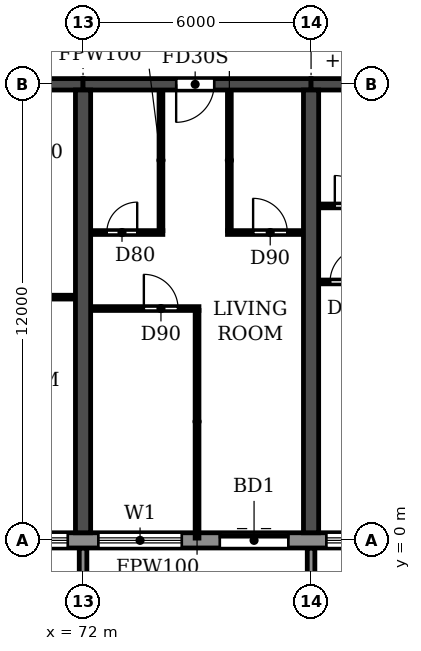
"""IFC4 building model, lengths in metres.
Left out: names, types, materials, properties, quantities, classifications, styles, units other than length and angle.
Written with IfcOpenShell. Run it as: python <this file> out.ifc"""

import sys

from ifc_helpers import new_model, si_unit, direction, frame, frame_2d, origin, place, context, subcontext, project, spatial, polyline, rectangle, outline, extrude, source, transform, mapped, element, fill, save


model = new_model("IFC4")
c1 = context("Model", 3, precision=1e-05, world=origin(), true_north=direction((0.0, 1.0)))
c2 = subcontext(c1, "Body", "Model", "MODEL_VIEW")
j1 = project(units=[si_unit("LENGTHUNIT", "METRE"), si_unit("PLANEANGLEUNIT", "RADIAN")], contexts=[c1])
p1 = place(None, origin())
s1 = spatial("IfcSite", under=j1, at=p1, CompositionType="ELEMENT")
p2 = place(p1, origin())
s2 = spatial("IfcBuilding", under=s1, at=p2, CompositionType="ELEMENT")
p3 = place(p2, frame((0.0, 0.0, 49.8)))
s3 = spatial("IfcBuildingStorey", under=s2, at=p3, CompositionType="ELEMENT", Elevation=49.8)
for number, where, z_axis, x_axis in (
    (1, (72.0, 0.2, 0.0), (0.0, 0.0, 1.0), (0.0, 1.0, 0.0)),
    (2, (78.0, 0.2, 0.0), (0.0, 0.0, 1.0), (0.0, 1.0, 0.0)),
):
    element("IfcWall", number, at=place(p3, frame(where, z_axis=z_axis, x_axis=x_axis)), inside=s3, PredefinedType="SHEAR", context=c2, shape_type="SweptSolid", body=[
        extrude(rectangle(XDim=11.65, YDim=0.4, at=frame_2d((5.825, 0.0))), origin(), (0.0, 0.0, 1.0), 3.0),
    ])
p4 = place(p3, frame((66.0, 12.0, 0.0), z_axis=(0.0, 0.0, 1.0), x_axis=(1.0, 0.0, 0.0)))
e3 = element("IfcWall", 3, at=p4, inside=s3, PredefinedType="SHEAR", context=c2, shape_type="SweptSolid", body=[
    extrude(rectangle(XDim=6.0, YDim=0.3, at=frame_2d((3.0, 0.0))), origin(), (0.0, 0.0, 1.0), 2.4),
])
p5 = place(p4, frame((2.55, 0.0, 0.0)))
e4 = element("IfcOpeningElement", 4, at=p5, cuts=e3, PredefinedType="OPENING", context=c2, shape_type="SweptSolid", body=[
    extrude(rectangle(XDim=1.0, YDim=2.1, at=frame_2d((0.5, 1.05))), frame((0.0, 0.16, 0.0), z_axis=(0.0, -1.0, 0.0), x_axis=(1.0, 0.0, 0.0)), (0.0, 0.0, 1.0), 0.32),
])
p6 = place(p3, frame((72.0, 12.0, 0.0), z_axis=(0.0, 0.0, 1.0), x_axis=(1.0, 0.0, 0.0)))
e5 = element("IfcWall", 5, at=p6, inside=s3, PredefinedType="SHEAR", context=c2, shape_type="SweptSolid", body=[
    extrude(rectangle(XDim=6.0, YDim=0.3, at=frame_2d((3.0, 0.0))), origin(), (0.0, 0.0, 1.0), 2.4),
])
p7 = place(p6, frame((2.45, 0.0, 0.0)))
e6 = element("IfcOpeningElement", 6, at=p7, cuts=e5, PredefinedType="OPENING", context=c2, shape_type="SweptSolid", body=[
    extrude(rectangle(XDim=1.0, YDim=2.1, at=frame_2d((0.5, 1.05))), frame((0.0, 0.16, 0.0), z_axis=(0.0, -1.0, 0.0), x_axis=(1.0, 0.0, 0.0)), (0.0, 0.0, 1.0), 0.32),
])
p8 = place(p3, frame((78.0, 12.0, 0.0), z_axis=(0.0, 0.0, 1.0), x_axis=(1.0, 0.0, 0.0)))
e7 = element("IfcWall", 7, at=p8, inside=s3, PredefinedType="SHEAR", context=c2, shape_type="SweptSolid", body=[
    extrude(rectangle(XDim=6.0, YDim=0.3, at=frame_2d((3.0, 0.0))), origin(), (0.0, 0.0, 1.0), 2.4),
])
p9 = place(p8, frame((2.45, 0.0, 0.0)))
e8 = element("IfcOpeningElement", 8, at=p9, cuts=e7, PredefinedType="OPENING", context=c2, shape_type="SweptSolid", body=[
    extrude(rectangle(XDim=1.0, YDim=2.1, at=frame_2d((0.5, 1.05))), frame((0.0, 0.16, 0.0), z_axis=(0.0, -1.0, 0.0), x_axis=(1.0, 0.0, 0.0)), (0.0, 0.0, 1.0), 0.32),
])
p10 = place(p3, frame((4.683, 0.0, 0.0), z_axis=(0.0, 0.0, 1.0), x_axis=(1.0, 0.0, 0.0)))
e9 = element("IfcWall", 9, at=p10, inside=s3, PredefinedType="STANDARD", context=c2, shape_type="SweptSolid", body=[
    extrude(rectangle(XDim=92.634, YDim=0.4, at=frame_2d((46.317, 0.0))), origin(), (0.0, 0.0, 1.0), 3.0),
])
p11 = place(p10, frame((1.717, 0.0, 0.9)))
e10 = element("IfcOpeningElement", 10, at=p11, cuts=e9, PredefinedType="OPENING", context=c2, shape_type="SweptSolid", body=[
    extrude(rectangle(XDim=2.2, YDim=1.5, at=frame_2d((1.1, 0.75))), frame((0.0, 0.21, 0.0), z_axis=(0.0, -1.0, 0.0), x_axis=(1.0, 0.0, 0.0)), (0.0, 0.0, 1.0), 0.42),
])
p12 = place(p10, frame((4.717, 0.0, 0.9)))
e11 = element("IfcOpeningElement", 11, at=p12, cuts=e9, PredefinedType="OPENING", context=c2, shape_type="SweptSolid", body=[
    extrude(rectangle(XDim=2.2, YDim=1.5, at=frame_2d((1.1, 0.75))), frame((0.0, 0.21, 0.0), z_axis=(0.0, -1.0, 0.0), x_axis=(1.0, 0.0, 0.0)), (0.0, 0.0, 1.0), 0.42),
])
p13 = place(p10, frame((7.717, 0.0, 0.9)))
e12 = element("IfcOpeningElement", 12, at=p13, cuts=e9, PredefinedType="OPENING", context=c2, shape_type="SweptSolid", body=[
    extrude(rectangle(XDim=2.2, YDim=1.5, at=frame_2d((1.1, 0.75))), frame((0.0, 0.21, 0.0), z_axis=(0.0, -1.0, 0.0), x_axis=(1.0, 0.0, 0.0)), (0.0, 0.0, 1.0), 0.42),
])
p14 = place(p10, frame((10.917, 0.0, 0.0)))
e13 = element("IfcOpeningElement", 13, at=p14, cuts=e9, PredefinedType="OPENING", context=c2, shape_type="SweptSolid", body=[
    extrude(rectangle(XDim=1.8, YDim=2.4, at=frame_2d((0.9, 1.2))), frame((0.0, 0.21, 0.0), z_axis=(0.0, -1.0, 0.0), x_axis=(1.0, 0.0, 0.0)), (0.0, 0.0, 1.0), 0.42),
])
p15 = place(p10, frame((13.717, 0.0, 0.9)))
e14 = element("IfcOpeningElement", 14, at=p15, cuts=e9, PredefinedType="OPENING", context=c2, shape_type="SweptSolid", body=[
    extrude(rectangle(XDim=2.2, YDim=1.5, at=frame_2d((1.1, 0.75))), frame((0.0, 0.21, 0.0), z_axis=(0.0, -1.0, 0.0), x_axis=(1.0, 0.0, 0.0)), (0.0, 0.0, 1.0), 0.42),
])
p16 = place(p10, frame((16.717, 0.0, 0.9)))
e15 = element("IfcOpeningElement", 15, at=p16, cuts=e9, PredefinedType="OPENING", context=c2, shape_type="SweptSolid", body=[
    extrude(rectangle(XDim=2.2, YDim=1.5, at=frame_2d((1.1, 0.75))), frame((0.0, 0.21, 0.0), z_axis=(0.0, -1.0, 0.0), x_axis=(1.0, 0.0, 0.0)), (0.0, 0.0, 1.0), 0.42),
])
p17 = place(p10, frame((19.917, 0.0, 0.0)))
e16 = element("IfcOpeningElement", 16, at=p17, cuts=e9, PredefinedType="OPENING", context=c2, shape_type="SweptSolid", body=[
    extrude(rectangle(XDim=1.8, YDim=2.4, at=frame_2d((0.9, 1.2))), frame((0.0, 0.21, 0.0), z_axis=(0.0, -1.0, 0.0), x_axis=(1.0, 0.0, 0.0)), (0.0, 0.0, 1.0), 0.42),
])
p18 = place(p10, frame((22.717, 0.0, 0.9)))
e17 = element("IfcOpeningElement", 17, at=p18, cuts=e9, PredefinedType="OPENING", context=c2, shape_type="SweptSolid", body=[
    extrude(rectangle(XDim=2.2, YDim=1.5, at=frame_2d((1.1, 0.75))), frame((0.0, 0.21, 0.0), z_axis=(0.0, -1.0, 0.0), x_axis=(1.0, 0.0, 0.0)), (0.0, 0.0, 1.0), 0.42),
])
p19 = place(p10, frame((25.717, 0.0, 0.9)))
e18 = element("IfcOpeningElement", 18, at=p19, cuts=e9, PredefinedType="OPENING", context=c2, shape_type="SweptSolid", body=[
    extrude(rectangle(XDim=2.2, YDim=1.5, at=frame_2d((1.1, 0.75))), frame((0.0, 0.21, 0.0), z_axis=(0.0, -1.0, 0.0), x_axis=(1.0, 0.0, 0.0)), (0.0, 0.0, 1.0), 0.42),
])
p20 = place(p10, frame((28.717, 0.0, 0.9)))
e19 = element("IfcOpeningElement", 19, at=p20, cuts=e9, PredefinedType="OPENING", context=c2, shape_type="SweptSolid", body=[
    extrude(rectangle(XDim=2.2, YDim=1.5, at=frame_2d((1.1, 0.75))), frame((0.0, 0.21, 0.0), z_axis=(0.0, -1.0, 0.0), x_axis=(1.0, 0.0, 0.0)), (0.0, 0.0, 1.0), 0.42),
])
p21 = place(p10, frame((31.717, 0.0, 0.9)))
e20 = element("IfcOpeningElement", 20, at=p21, cuts=e9, PredefinedType="OPENING", context=c2, shape_type="SweptSolid", body=[
    extrude(rectangle(XDim=2.2, YDim=1.5, at=frame_2d((1.1, 0.75))), frame((0.0, 0.21, 0.0), z_axis=(0.0, -1.0, 0.0), x_axis=(1.0, 0.0, 0.0)), (0.0, 0.0, 1.0), 0.42),
])
p22 = place(p10, frame((34.917, 0.0, 0.0)))
e21 = element("IfcOpeningElement", 21, at=p22, cuts=e9, PredefinedType="OPENING", context=c2, shape_type="SweptSolid", body=[
    extrude(rectangle(XDim=1.8, YDim=2.4, at=frame_2d((0.9, 1.2))), frame((0.0, 0.21, 0.0), z_axis=(0.0, -1.0, 0.0), x_axis=(1.0, 0.0, 0.0)), (0.0, 0.0, 1.0), 0.42),
])
p23 = place(p10, frame((37.717, 0.0, 0.9)))
e22 = element("IfcOpeningElement", 22, at=p23, cuts=e9, PredefinedType="OPENING", context=c2, shape_type="SweptSolid", body=[
    extrude(rectangle(XDim=2.2, YDim=1.5, at=frame_2d((1.1, 0.75))), frame((0.0, 0.21, 0.0), z_axis=(0.0, -1.0, 0.0), x_axis=(1.0, 0.0, 0.0)), (0.0, 0.0, 1.0), 0.42),
])
p24 = place(p10, frame((40.717, 0.0, 0.9)))
e23 = element("IfcOpeningElement", 23, at=p24, cuts=e9, PredefinedType="OPENING", context=c2, shape_type="SweptSolid", body=[
    extrude(rectangle(XDim=2.2, YDim=1.5, at=frame_2d((1.1, 0.75))), frame((0.0, 0.21, 0.0), z_axis=(0.0, -1.0, 0.0), x_axis=(1.0, 0.0, 0.0)), (0.0, 0.0, 1.0), 0.42),
])
p25 = place(p10, frame((43.717, 0.0, 0.9)))
e24 = element("IfcOpeningElement", 24, at=p25, cuts=e9, PredefinedType="OPENING", context=c2, shape_type="SweptSolid", body=[
    extrude(rectangle(XDim=2.2, YDim=1.5, at=frame_2d((1.1, 0.75))), frame((0.0, 0.21, 0.0), z_axis=(0.0, -1.0, 0.0), x_axis=(1.0, 0.0, 0.0)), (0.0, 0.0, 1.0), 0.42),
])
p26 = place(p10, frame((46.917, 0.0, 0.0)))
e25 = element("IfcOpeningElement", 25, at=p26, cuts=e9, PredefinedType="OPENING", context=c2, shape_type="SweptSolid", body=[
    extrude(rectangle(XDim=1.8, YDim=2.4, at=frame_2d((0.9, 1.2))), frame((0.0, 0.21, 0.0), z_axis=(0.0, -1.0, 0.0), x_axis=(1.0, 0.0, 0.0)), (0.0, 0.0, 1.0), 0.42),
])
p27 = place(p10, frame((49.717, 0.0, 0.9)))
e26 = element("IfcOpeningElement", 26, at=p27, cuts=e9, PredefinedType="OPENING", context=c2, shape_type="SweptSolid", body=[
    extrude(rectangle(XDim=2.2, YDim=1.5, at=frame_2d((1.1, 0.75))), frame((0.0, 0.21, 0.0), z_axis=(0.0, -1.0, 0.0), x_axis=(1.0, 0.0, 0.0)), (0.0, 0.0, 1.0), 0.42),
])
p28 = place(p10, frame((52.717, 0.0, 0.9)))
e27 = element("IfcOpeningElement", 27, at=p28, cuts=e9, PredefinedType="OPENING", context=c2, shape_type="SweptSolid", body=[
    extrude(rectangle(XDim=2.2, YDim=1.5, at=frame_2d((1.1, 0.75))), frame((0.0, 0.21, 0.0), z_axis=(0.0, -1.0, 0.0), x_axis=(1.0, 0.0, 0.0)), (0.0, 0.0, 1.0), 0.42),
])
p29 = place(p10, frame((55.717, 0.0, 0.9)))
e28 = element("IfcOpeningElement", 28, at=p29, cuts=e9, PredefinedType="OPENING", context=c2, shape_type="SweptSolid", body=[
    extrude(rectangle(XDim=2.2, YDim=1.5, at=frame_2d((1.1, 0.75))), frame((0.0, 0.21, 0.0), z_axis=(0.0, -1.0, 0.0), x_axis=(1.0, 0.0, 0.0)), (0.0, 0.0, 1.0), 0.42),
])
p30 = place(p10, frame((58.917, 0.0, 0.0)))
e29 = element("IfcOpeningElement", 29, at=p30, cuts=e9, PredefinedType="OPENING", context=c2, shape_type="SweptSolid", body=[
    extrude(rectangle(XDim=1.8, YDim=2.4, at=frame_2d((0.9, 1.2))), frame((0.0, 0.21, 0.0), z_axis=(0.0, -1.0, 0.0), x_axis=(1.0, 0.0, 0.0)), (0.0, 0.0, 1.0), 0.42),
])
p31 = place(p10, frame((61.717, 0.0, 0.9)))
e30 = element("IfcOpeningElement", 30, at=p31, cuts=e9, PredefinedType="OPENING", context=c2, shape_type="SweptSolid", body=[
    extrude(rectangle(XDim=2.2, YDim=1.5, at=frame_2d((1.1, 0.75))), frame((0.0, 0.21, 0.0), z_axis=(0.0, -1.0, 0.0), x_axis=(1.0, 0.0, 0.0)), (0.0, 0.0, 1.0), 0.42),
])
p32 = place(p10, frame((64.717, 0.0, 0.9)))
e31 = element("IfcOpeningElement", 31, at=p32, cuts=e9, PredefinedType="OPENING", context=c2, shape_type="SweptSolid", body=[
    extrude(rectangle(XDim=2.2, YDim=1.5, at=frame_2d((1.1, 0.75))), frame((0.0, 0.21, 0.0), z_axis=(0.0, -1.0, 0.0), x_axis=(1.0, 0.0, 0.0)), (0.0, 0.0, 1.0), 0.42),
])
p33 = place(p10, frame((67.717, 0.0, 0.9)))
e32 = element("IfcOpeningElement", 32, at=p33, cuts=e9, PredefinedType="OPENING", context=c2, shape_type="SweptSolid", body=[
    extrude(rectangle(XDim=2.2, YDim=1.5, at=frame_2d((1.1, 0.75))), frame((0.0, 0.21, 0.0), z_axis=(0.0, -1.0, 0.0), x_axis=(1.0, 0.0, 0.0)), (0.0, 0.0, 1.0), 0.42),
])
p34 = place(p10, frame((70.917, 0.0, 0.0)))
e33 = element("IfcOpeningElement", 33, at=p34, cuts=e9, PredefinedType="OPENING", context=c2, shape_type="SweptSolid", body=[
    extrude(rectangle(XDim=1.8, YDim=2.4, at=frame_2d((0.9, 1.2))), frame((0.0, 0.21, 0.0), z_axis=(0.0, -1.0, 0.0), x_axis=(1.0, 0.0, 0.0)), (0.0, 0.0, 1.0), 0.42),
])
p35 = place(p10, frame((73.717, 0.0, 0.9)))
e34 = element("IfcOpeningElement", 34, at=p35, cuts=e9, PredefinedType="OPENING", context=c2, shape_type="SweptSolid", body=[
    extrude(rectangle(XDim=2.2, YDim=1.5, at=frame_2d((1.1, 0.75))), frame((0.0, 0.21, 0.0), z_axis=(0.0, -1.0, 0.0), x_axis=(1.0, 0.0, 0.0)), (0.0, 0.0, 1.0), 0.42),
])
p36 = place(p10, frame((76.717, 0.0, 0.9)))
e35 = element("IfcOpeningElement", 35, at=p36, cuts=e9, PredefinedType="OPENING", context=c2, shape_type="SweptSolid", body=[
    extrude(rectangle(XDim=2.2, YDim=1.5, at=frame_2d((1.1, 0.75))), frame((0.0, 0.21, 0.0), z_axis=(0.0, -1.0, 0.0), x_axis=(1.0, 0.0, 0.0)), (0.0, 0.0, 1.0), 0.42),
])
p37 = place(p10, frame((79.717, 0.0, 0.9)))
e36 = element("IfcOpeningElement", 36, at=p37, cuts=e9, PredefinedType="OPENING", context=c2, shape_type="SweptSolid", body=[
    extrude(rectangle(XDim=2.2, YDim=1.5, at=frame_2d((1.1, 0.75))), frame((0.0, 0.21, 0.0), z_axis=(0.0, -1.0, 0.0), x_axis=(1.0, 0.0, 0.0)), (0.0, 0.0, 1.0), 0.42),
])
p38 = place(p10, frame((82.917, 0.0, 0.0)))
e37 = element("IfcOpeningElement", 37, at=p38, cuts=e9, PredefinedType="OPENING", context=c2, shape_type="SweptSolid", body=[
    extrude(rectangle(XDim=1.8, YDim=2.4, at=frame_2d((0.9, 1.2))), frame((0.0, 0.21, 0.0), z_axis=(0.0, -1.0, 0.0), x_axis=(1.0, 0.0, 0.0)), (0.0, 0.0, 1.0), 0.42),
])
p39 = place(p10, frame((85.717, 0.0, 0.9)))
e38 = element("IfcOpeningElement", 38, at=p39, cuts=e9, PredefinedType="OPENING", context=c2, shape_type="SweptSolid", body=[
    extrude(rectangle(XDim=2.2, YDim=1.5, at=frame_2d((1.1, 0.75))), frame((0.0, 0.21, 0.0), z_axis=(0.0, -1.0, 0.0), x_axis=(1.0, 0.0, 0.0)), (0.0, 0.0, 1.0), 0.42),
])
p40 = place(p10, frame((88.717, 0.0, 0.9)))
e39 = element("IfcOpeningElement", 39, at=p40, cuts=e9, PredefinedType="OPENING", context=c2, shape_type="SweptSolid", body=[
    extrude(rectangle(XDim=2.2, YDim=1.5, at=frame_2d((1.1, 0.75))), frame((0.0, 0.21, 0.0), z_axis=(0.0, -1.0, 0.0), x_axis=(1.0, 0.0, 0.0)), (0.0, 0.0, 1.0), 0.42),
])
m1 = source(origin(), c2, "Body", "SweptSolid", [
    extrude(outline(polyline([(0.0, 0.0), (0.2, 0.0), (0.2, 1.65), (0.0, 1.65), (0.0, 0.0)])), origin(), (0.0, 0.0, 1.0), 3.1),
])
for number, where in (
    (40, (71.9, -1.85, 0.0)),
    (41, (77.9, -1.85, 0.0)),
):
    element("IfcWall", number, at=place(p3, frame(where)), inside=s3, PredefinedType="STANDARD", context=c2, shape_type="MappedRepresentation", body=[
        mapped(m1, transform((0.0, 0.0, 0.0))),
    ])
p41 = place(p3, frame((72.21, 6.1, 0.0), z_axis=(0.0, 0.0, 1.0), x_axis=(1.0, 0.0, 0.0)))
e42 = element("IfcWall", 42, at=p41, inside=s3, PredefinedType="PARTITIONING", context=c2, shape_type="SweptSolid", body=[
    extrude(rectangle(XDim=2.84, YDim=0.1, at=frame_2d((1.42, 0.0))), origin(), (0.0, 0.0, 1.0), 3.0),
])
p42 = place(p41, frame((1.39, 0.0, 0.0)))
e43 = element("IfcOpeningElement", 43, at=p42, cuts=e42, PredefinedType="OPENING", context=c2, shape_type="SweptSolid", body=[
    extrude(rectangle(XDim=0.9, YDim=2.1, at=frame_2d((0.45, 1.05))), frame((0.0, 0.06, 0.0), z_axis=(0.0, -1.0, 0.0), x_axis=(1.0, 0.0, 0.0)), (0.0, 0.0, 1.0), 0.12),
])
p43 = place(p3, frame((69.9, 6.4, 0.0), z_axis=(0.0, 0.0, 1.0), x_axis=(1.0, 0.0, 0.0)))
e44 = element("IfcWall", 44, at=p43, inside=s3, PredefinedType="PARTITIONING", context=c2, shape_type="SweptSolid", body=[
    extrude(rectangle(XDim=1.89, YDim=0.1, at=frame_2d((0.945, 0.0))), origin(), (0.0, 0.0, 1.0), 3.0),
])
p44 = place(p3, frame((78.21, 6.8, 0.0), z_axis=(0.0, 0.0, 1.0), x_axis=(1.0, 0.0, 0.0)))
e45 = element("IfcWall", 45, at=p44, inside=s3, PredefinedType="PARTITIONING", context=c2, shape_type="SweptSolid", body=[
    extrude(rectangle(XDim=2.84, YDim=0.1, at=frame_2d((1.42, 0.0))), origin(), (0.0, 0.0, 1.0), 3.0),
])
p45 = place(p44, frame((0.29, 0.0, 0.0)))
e46 = element("IfcOpeningElement", 46, at=p45, cuts=e45, PredefinedType="OPENING", context=c2, shape_type="SweptSolid", body=[
    extrude(rectangle(XDim=0.9, YDim=2.1, at=frame_2d((0.45, 1.05))), frame((0.0, 0.06, 0.0), z_axis=(0.0, -1.0, 0.0), x_axis=(1.0, 0.0, 0.0)), (0.0, 0.0, 1.0), 0.12),
])
p46 = place(p3, frame((72.21, 8.1, 0.0), z_axis=(0.0, 0.0, 1.0), x_axis=(1.0, 0.0, 0.0)))
e47 = element("IfcWall", 47, at=p46, inside=s3, PredefinedType="PARTITIONING", context=c2, shape_type="SweptSolid", body=[
    extrude(rectangle(XDim=1.89, YDim=0.1, at=frame_2d((0.945, 0.0))), origin(), (0.0, 0.0, 1.0), 3.0),
])
p47 = place(p46, frame((0.415, 0.0, 0.0)))
e48 = element("IfcOpeningElement", 48, at=p47, cuts=e47, PredefinedType="OPENING", context=c2, shape_type="SweptSolid", body=[
    extrude(rectangle(XDim=0.8, YDim=2.1, at=frame_2d((0.4, 1.05))), frame((0.0, 0.06, 0.0), z_axis=(0.0, -1.0, 0.0), x_axis=(1.0, 0.0, 0.0)), (0.0, 0.0, 1.0), 0.12),
])
p48 = place(p3, frame((75.8, 8.1, 0.0), z_axis=(0.0, 0.0, 1.0), x_axis=(1.0, 0.0, 0.0)))
e49 = element("IfcWall", 49, at=p48, inside=s3, PredefinedType="PARTITIONING", context=c2, shape_type="SweptSolid", body=[
    extrude(rectangle(XDim=1.99, YDim=0.1, at=frame_2d((0.995, 0.0))), origin(), (0.0, 0.0, 1.0), 3.0),
])
p49 = place(p48, frame((0.675, 0.0, 0.0)))
e50 = element("IfcOpeningElement", 50, at=p49, cuts=e49, PredefinedType="OPENING", context=c2, shape_type="SweptSolid", body=[
    extrude(rectangle(XDim=0.9, YDim=2.1, at=frame_2d((0.45, 1.05))), frame((0.0, 0.06, 0.0), z_axis=(0.0, -1.0, 0.0), x_axis=(1.0, 0.0, 0.0)), (0.0, 0.0, 1.0), 0.12),
])
p50 = place(p3, frame((78.21, 8.8, 0.0), z_axis=(0.0, 0.0, 1.0), x_axis=(1.0, 0.0, 0.0)))
e51 = element("IfcWall", 51, at=p50, inside=s3, PredefinedType="PARTITIONING", context=c2, shape_type="SweptSolid", body=[
    extrude(rectangle(XDim=1.89, YDim=0.1, at=frame_2d((0.945, 0.0))), origin(), (0.0, 0.0, 1.0), 3.0),
])
p51 = place(p50, frame((0.415, 0.0, 0.0)))
e52 = element("IfcOpeningElement", 52, at=p51, cuts=e51, PredefinedType="OPENING", context=c2, shape_type="SweptSolid", body=[
    extrude(rectangle(XDim=0.8, YDim=2.1, at=frame_2d((0.4, 1.05))), frame((0.0, 0.06, 0.0), z_axis=(0.0, -1.0, 0.0), x_axis=(1.0, 0.0, 0.0)), (0.0, 0.0, 1.0), 0.12),
])
p52 = place(p3, frame((74.05, 8.15, 0.0), z_axis=(0.0, 0.0, 1.0), x_axis=(0.0, 1.0, 0.0)))
e53 = element("IfcWall", 53, at=p52, inside=s3, PredefinedType="PARTITIONING", context=c2, shape_type="SweptSolid", body=[
    extrude(rectangle(XDim=3.69, YDim=0.1, at=frame_2d((1.845, 0.0))), origin(), (0.0, 0.0, 1.0), 3.0),
])
p53 = place(p3, frame((75.0, 0.06, 0.0), z_axis=(0.0, 0.0, 1.0), x_axis=(0.0, 1.0, 0.0)))
e54 = element("IfcWall", 54, at=p53, inside=s3, PredefinedType="PARTITIONING", context=c2, shape_type="SweptSolid", body=[
    extrude(rectangle(XDim=5.99, YDim=0.1, at=frame_2d((2.995, 0.0))), origin(), (0.0, 0.0, 1.0), 3.0),
])
p54 = place(p3, frame((75.85, 8.15, 0.0), z_axis=(0.0, 0.0, 1.0), x_axis=(0.0, 1.0, 0.0)))
e55 = element("IfcWall", 55, at=p54, inside=s3, PredefinedType="PARTITIONING", context=c2, shape_type="SweptSolid", body=[
    extrude(rectangle(XDim=3.69, YDim=0.1, at=frame_2d((1.845, 0.0))), origin(), (0.0, 0.0, 1.0), 3.0),
])
p55 = place(p32, origin())
e56 = element("IfcWindow", 56, at=p55, inside=s3, PartitioningType="DOUBLE_PANEL_HORIZONTAL", PredefinedType="WINDOW", context=c2, shape_type="SweptSolid", body=[
    extrude(rectangle(XDim=2.2, YDim=1.5, at=frame_2d((1.1, 0.75))), frame((0.0, 0.03, 0.0), z_axis=(0.0, -1.0, 0.0), x_axis=(1.0, 0.0, 0.0)), (0.0, 0.0, 1.0), 0.06),
])
fill(e31, e56)
p56 = place(p33, origin())
e57 = element("IfcWindow", 57, at=p56, inside=s3, PartitioningType="DOUBLE_PANEL_HORIZONTAL", PredefinedType="WINDOW", context=c2, shape_type="SweptSolid", body=[
    extrude(rectangle(XDim=2.2, YDim=1.5, at=frame_2d((1.1, 0.75))), frame((0.0, 0.03, 0.0), z_axis=(0.0, -1.0, 0.0), x_axis=(1.0, 0.0, 0.0)), (0.0, 0.0, 1.0), 0.06),
])
fill(e32, e57)
p57 = place(p34, origin())
e58 = element("IfcDoor", 58, at=p57, inside=s3, OperationType="DOUBLE_DOOR_SLIDING", PredefinedType="DOOR", context=c2, shape_type="SweptSolid", body=[
    extrude(rectangle(XDim=1.8, YDim=2.4, at=frame_2d((0.9, 1.2))), frame((0.0, 0.025, 0.0), z_axis=(0.0, -1.0, 0.0), x_axis=(1.0, 0.0, 0.0)), (0.0, 0.0, 1.0), 0.05),
])
fill(e33, e58)
p58 = place(p35, origin())
e59 = element("IfcWindow", 59, at=p58, inside=s3, PartitioningType="DOUBLE_PANEL_HORIZONTAL", PredefinedType="WINDOW", context=c2, shape_type="SweptSolid", body=[
    extrude(rectangle(XDim=2.2, YDim=1.5, at=frame_2d((1.1, 0.75))), frame((0.0, 0.03, 0.0), z_axis=(0.0, -1.0, 0.0), x_axis=(1.0, 0.0, 0.0)), (0.0, 0.0, 1.0), 0.06),
])
fill(e34, e59)
p59 = place(p47, origin())
e60 = element("IfcDoor", 60, at=p59, inside=s3, OperationType="SINGLE_SWING_RIGHT", PredefinedType="DOOR", context=c2, shape_type="SweptSolid", body=[
    extrude(rectangle(XDim=0.8, YDim=2.1, at=frame_2d((0.4, 1.05))), frame((0.0, 0.025, 0.0), z_axis=(0.0, -1.0, 0.0), x_axis=(1.0, 0.0, 0.0)), (0.0, 0.0, 1.0), 0.05),
])
fill(e48, e60)
p60 = place(p42, origin())
e61 = element("IfcDoor", 61, at=p60, inside=s3, OperationType="SINGLE_SWING_LEFT", PredefinedType="DOOR", context=c2, shape_type="SweptSolid", body=[
    extrude(rectangle(XDim=0.9, YDim=2.1, at=frame_2d((0.45, 1.05))), frame((0.0, 0.025, 0.0), z_axis=(0.0, -1.0, 0.0), x_axis=(1.0, 0.0, 0.0)), (0.0, 0.0, 1.0), 0.05),
])
fill(e43, e61)
p61 = place(p7, frame((1.0, 0.0, 0.0), z_axis=(0.0, 0.0, 1.0), x_axis=(-1.0, 0.0, 0.0)))
e62 = element("IfcDoor", 62, at=p61, inside=s3, OperationType="SINGLE_SWING_RIGHT", PredefinedType="DOOR", context=c2, shape_type="SweptSolid", body=[
    extrude(rectangle(XDim=1.0, YDim=2.1, at=frame_2d((0.5, 1.05))), frame((0.0, 0.025, 0.0), z_axis=(0.0, -1.0, 0.0), x_axis=(1.0, 0.0, 0.0)), (0.0, 0.0, 1.0), 0.05),
])
fill(e6, e62)
p62 = place(p49, origin())
e63 = element("IfcDoor", 63, at=p62, inside=s3, OperationType="SINGLE_SWING_LEFT", PredefinedType="DOOR", context=c2, shape_type="SweptSolid", body=[
    extrude(rectangle(XDim=0.9, YDim=2.1, at=frame_2d((0.45, 1.05))), frame((0.0, 0.025, 0.0), z_axis=(0.0, -1.0, 0.0), x_axis=(1.0, 0.0, 0.0)), (0.0, 0.0, 1.0), 0.05),
])
fill(e50, e63)
p63 = place(p45, origin())
e64 = element("IfcDoor", 64, at=p63, inside=s3, OperationType="SINGLE_SWING_RIGHT", PredefinedType="DOOR", context=c2, shape_type="SweptSolid", body=[
    extrude(rectangle(XDim=0.9, YDim=2.1, at=frame_2d((0.45, 1.05))), frame((0.0, 0.025, 0.0), z_axis=(0.0, -1.0, 0.0), x_axis=(1.0, 0.0, 0.0)), (0.0, 0.0, 1.0), 0.05),
])
fill(e46, e64)
p64 = place(p51, origin())
e65 = element("IfcDoor", 65, at=p64, inside=s3, OperationType="SINGLE_SWING_LEFT", PredefinedType="DOOR", context=c2, shape_type="SweptSolid", body=[
    extrude(rectangle(XDim=0.8, YDim=2.1, at=frame_2d((0.4, 1.05))), frame((0.0, 0.025, 0.0), z_axis=(0.0, -1.0, 0.0), x_axis=(1.0, 0.0, 0.0)), (0.0, 0.0, 1.0), 0.05),
])
fill(e52, e65)
save(model, sys.argv[1])
